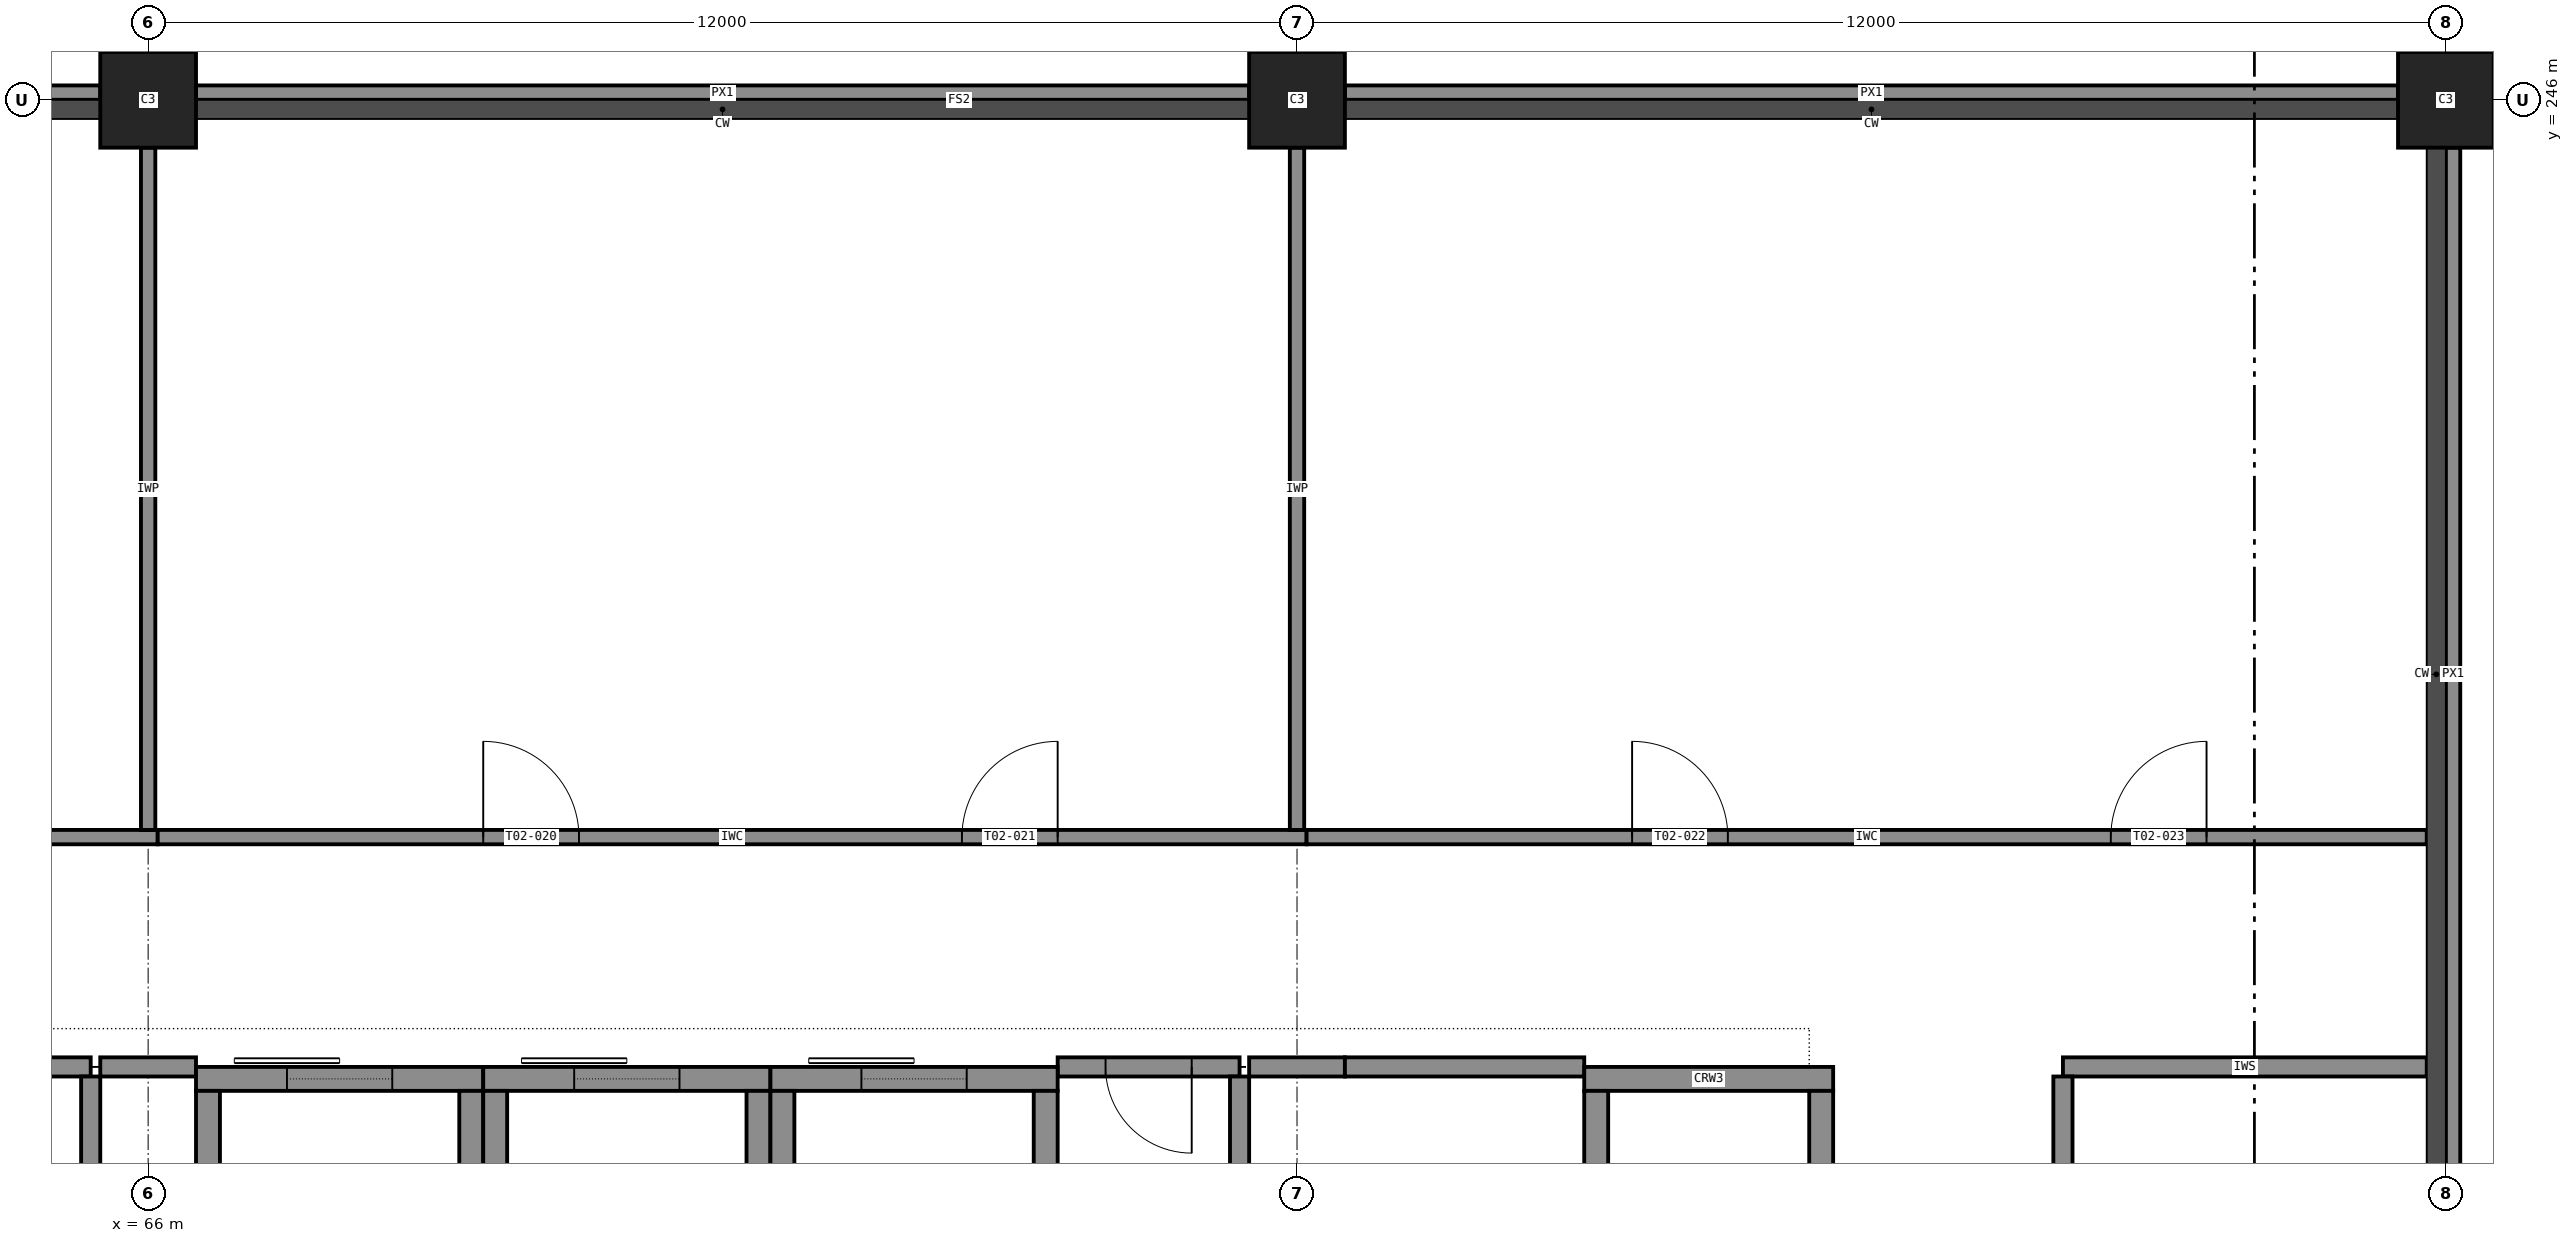
"""IFC4 building model, lengths in metres.
Left out: names, types, materials, properties, quantities, classifications, styles, units other than length and angle.
Written with IfcOpenShell. Run it as: python <this file> out.ifc"""

import sys

from ifc_helpers import new_model, si_unit, direction, frame, frame_2d, origin, origin_2d, place, context, subcontext, project, spatial, rectangle, extrude, element, fill, save


model = new_model("IFC4")
c1 = context("Model", 3, precision=1e-05, world=origin(), true_north=direction((0.0, 1.0)))
c2 = subcontext(c1, "Body", "Model", "MODEL_VIEW")
j1 = project(units=[si_unit("LENGTHUNIT", "METRE"), si_unit("PLANEANGLEUNIT", "RADIAN")], contexts=[c1])
p1 = place(None, origin())
s1 = spatial("IfcSite", under=j1, at=p1, CompositionType="ELEMENT")
p2 = place(p1, origin())
s2 = spatial("IfcBuilding", under=s1, at=p2, CompositionType="ELEMENT")
p3 = place(p2, frame((0.0, 0.0, 12.0)))
s3 = spatial("IfcBuildingStorey", under=s2, at=p3, CompositionType="ELEMENT", Elevation=12.0)
for number, where, z_axis, x_axis in (
    (1, (66.0, 246.0, 0.0), (0.0, 0.0, 1.0), (1.0, 0.0, 0.0)),
    (2, (78.0, 246.0, 0.0), (0.0, 0.0, 1.0), (1.0, 0.0, 0.0)),
    (3, (90.0, 246.0, 0.0), (0.0, 0.0, 1.0), (1.0, 0.0, 0.0)),
):
    element("IfcColumn", number, at=place(p3, frame(where, z_axis=z_axis, x_axis=x_axis)), inside=s3, PredefinedType="COLUMN", context=c2, shape_type="SweptSolid", body=[
        extrude(rectangle(XDim=1.0, YDim=1.0, at=origin_2d()), origin(), (0.0, 0.0, 1.0), 5.0),
    ])
p4 = place(p3, frame((66.5, 235.775, 0.0), z_axis=(0.0, 0.0, 1.0), x_axis=(1.0, 0.0, 0.0)))
e4 = element("IfcWall", 4, at=p4, inside=s3, PredefinedType="SHEAR", context=c2, shape_type="SweptSolid", body=[
    extrude(rectangle(XDim=3.0, YDim=0.25, at=frame_2d((1.5, 0.0))), origin(), (0.0, 0.0, 1.0), 5.0),
])
p5 = place(p4, frame((0.95, 0.0, 0.0)))
e5 = element("IfcOpeningElement", 5, at=p5, cuts=e4, PredefinedType="OPENING", context=c2, shape_type="SweptSolid", body=[
    extrude(rectangle(XDim=1.1, YDim=2.1, at=frame_2d((0.55, 1.05))), frame((0.0, 0.135, 0.0), z_axis=(0.0, -1.0, 0.0), x_axis=(1.0, 0.0, 0.0)), (0.0, 0.0, 1.0), 0.27),
])
for number, where, z_axis, x_axis in (
    (6, (66.625, 232.35, 0.0), (0.0, 0.0, 1.0), (0.0, 1.0, 0.0)),
    (7, (69.375, 232.35, 0.0), (0.0, 0.0, 1.0), (0.0, 1.0, 0.0)),
):
    element("IfcWall", number, at=place(p3, frame(where, z_axis=z_axis, x_axis=x_axis)), inside=s3, PredefinedType="SHEAR", context=c2, shape_type="SweptSolid", body=[
        extrude(rectangle(XDim=3.3, YDim=0.25, at=frame_2d((1.65, 0.0))), origin(), (0.0, 0.0, 1.0), 5.0),
    ])
p6 = place(p3, frame((69.5, 235.775, 0.0), z_axis=(0.0, 0.0, 1.0), x_axis=(1.0, 0.0, 0.0)))
e8 = element("IfcWall", 8, at=p6, inside=s3, PredefinedType="SHEAR", context=c2, shape_type="SweptSolid", body=[
    extrude(rectangle(XDim=3.0, YDim=0.25, at=frame_2d((1.5, 0.0))), origin(), (0.0, 0.0, 1.0), 5.0),
])
p7 = place(p6, frame((0.95, 0.0, 0.0)))
e9 = element("IfcOpeningElement", 9, at=p7, cuts=e8, PredefinedType="OPENING", context=c2, shape_type="SweptSolid", body=[
    extrude(rectangle(XDim=1.1, YDim=2.1, at=frame_2d((0.55, 1.05))), frame((0.0, 0.135, 0.0), z_axis=(0.0, -1.0, 0.0), x_axis=(1.0, 0.0, 0.0)), (0.0, 0.0, 1.0), 0.27),
])
for number, where, z_axis, x_axis in (
    (10, (69.625, 232.35, 0.0), (0.0, 0.0, 1.0), (0.0, 1.0, 0.0)),
    (11, (72.375, 232.35, 0.0), (0.0, 0.0, 1.0), (0.0, 1.0, 0.0)),
):
    element("IfcWall", number, at=place(p3, frame(where, z_axis=z_axis, x_axis=x_axis)), inside=s3, PredefinedType="SHEAR", context=c2, shape_type="SweptSolid", body=[
        extrude(rectangle(XDim=3.3, YDim=0.25, at=frame_2d((1.65, 0.0))), origin(), (0.0, 0.0, 1.0), 5.0),
    ])
p8 = place(p3, frame((72.5, 235.775, 0.0), z_axis=(0.0, 0.0, 1.0), x_axis=(1.0, 0.0, 0.0)))
e12 = element("IfcWall", 12, at=p8, inside=s3, PredefinedType="SHEAR", context=c2, shape_type="SweptSolid", body=[
    extrude(rectangle(XDim=3.0, YDim=0.25, at=frame_2d((1.5, 0.0))), origin(), (0.0, 0.0, 1.0), 5.0),
])
p9 = place(p8, frame((0.95, 0.0, 0.0)))
e13 = element("IfcOpeningElement", 13, at=p9, cuts=e12, PredefinedType="OPENING", context=c2, shape_type="SweptSolid", body=[
    extrude(rectangle(XDim=1.1, YDim=2.1, at=frame_2d((0.55, 1.05))), frame((0.0, 0.135, 0.0), z_axis=(0.0, -1.0, 0.0), x_axis=(1.0, 0.0, 0.0)), (0.0, 0.0, 1.0), 0.27),
])
for number, where, z_axis, x_axis in (
    (14, (72.625, 232.35, 0.0), (0.0, 0.0, 1.0), (0.0, 1.0, 0.0)),
    (15, (75.375, 232.35, 0.0), (0.0, 0.0, 1.0), (0.0, 1.0, 0.0)),
):
    element("IfcWall", number, at=place(p3, frame(where, z_axis=z_axis, x_axis=x_axis)), inside=s3, PredefinedType="SHEAR", context=c2, shape_type="SweptSolid", body=[
        extrude(rectangle(XDim=3.3, YDim=0.25, at=frame_2d((1.65, 0.0))), origin(), (0.0, 0.0, 1.0), 5.0),
    ])
p10 = place(p3, frame((81.0, 235.775, 0.0), z_axis=(0.0, 0.0, 1.0), x_axis=(1.0, 0.0, 0.0)))
e16 = element("IfcWall", 16, at=p10, inside=s3, PredefinedType="SHEAR", context=c2, shape_type="SweptSolid", body=[
    extrude(rectangle(XDim=2.6, YDim=0.25, at=frame_2d((1.3, 0.0))), origin(), (0.0, 0.0, 1.0), 5.0),
])
p11 = place(p3, frame((81.125, 232.35, 0.0), z_axis=(0.0, 0.0, 1.0), x_axis=(0.0, 1.0, 0.0)))
e17 = element("IfcWall", 17, at=p11, inside=s3, PredefinedType="SHEAR", context=c2, shape_type="SweptSolid", body=[
    extrude(rectangle(XDim=3.3, YDim=0.25, at=frame_2d((1.65, 0.0))), origin(), (0.0, 0.0, 1.0), 5.0),
])
p12 = place(p11, frame((1.1, 0.0, 0.0)))
e18 = element("IfcOpeningElement", 18, at=p12, cuts=e17, PredefinedType="OPENING", context=c2, shape_type="SweptSolid", body=[
    extrude(rectangle(XDim=1.1, YDim=2.1, at=frame_2d((0.55, 1.05))), frame((0.0, 0.135, 0.0), z_axis=(0.0, -1.0, 0.0), x_axis=(1.0, 0.0, 0.0)), (0.0, 0.0, 1.0), 0.27),
])
p13 = place(p3, frame((83.475, 232.35, 0.0), z_axis=(0.0, 0.0, 1.0), x_axis=(0.0, 1.0, 0.0)))
e19 = element("IfcWall", 19, at=p13, inside=s3, PredefinedType="SHEAR", context=c2, shape_type="SweptSolid", body=[
    extrude(rectangle(XDim=3.3, YDim=0.25, at=frame_2d((1.65, 0.0))), origin(), (0.0, 0.0, 1.0), 5.0),
])
for number, where, z_axis, x_axis in (
    (20, (90.075, 234.5, 4.75), (0.0, 0.0, 1.0), (0.0, 1.0, 0.0)),
    (21, (89.5, 246.075, 4.75), (0.0, 0.0, 1.0), (-1.0, 0.0, 0.0)),
    (22, (77.5, 246.075, 4.75), (0.0, 0.0, 1.0), (-1.0, 0.0, 0.0)),
    (23, (65.5, 246.075, 4.75), (0.0, 0.0, 1.0), (-1.0, 0.0, 0.0)),
):
    element("IfcWall", number, at=place(p3, frame(where, z_axis=z_axis, x_axis=x_axis)), inside=s3, PredefinedType="STANDARD", context=c2, shape_type="SweptSolid", body=[
        extrude(rectangle(XDim=11.0, YDim=0.15, at=frame_2d((5.5, 0.0))), origin(), (0.0, 0.0, 1.0), 0.25),
    ])
p14 = place(p3, frame((63.5, 235.9, 0.0), z_axis=(0.0, 0.0, 1.0), x_axis=(1.0, 0.0, 0.0)))
e24 = element("IfcWall", 24, at=p14, inside=s3, PredefinedType="PARTITIONING", context=c2, shape_type="SweptSolid", body=[
    extrude(rectangle(XDim=1.9, YDim=0.2, at=frame_2d((0.95, 0.0))), origin(), (0.0, 0.0, 1.0), 4.75),
])
p15 = place(p3, frame((65.5, 235.9, 0.0), z_axis=(0.0, 0.0, 1.0), x_axis=(1.0, 0.0, 0.0)))
e25 = element("IfcWall", 25, at=p15, inside=s3, PredefinedType="PARTITIONING", context=c2, shape_type="SweptSolid", body=[
    extrude(rectangle(XDim=1.0, YDim=0.2, at=frame_2d((0.5, 0.0))), origin(), (0.0, 0.0, 1.0), 4.75),
])
p16 = place(p3, frame((77.4, 235.9, 0.0), z_axis=(0.0, 0.0, 1.0), x_axis=(-1.0, 0.0, 0.0)))
e26 = element("IfcWall", 26, at=p16, inside=s3, PredefinedType="PARTITIONING", context=c2, shape_type="SweptSolid", body=[
    extrude(rectangle(XDim=1.9, YDim=0.2, at=frame_2d((0.95, 0.0))), origin(), (0.0, 0.0, 1.0), 4.75),
])
p17 = place(p16, frame((0.5, 0.0, 0.0)))
e27 = element("IfcOpeningElement", 27, at=p17, cuts=e26, PredefinedType="OPENING", context=c2, shape_type="SweptSolid", body=[
    extrude(rectangle(XDim=0.9, YDim=2.1, at=frame_2d((0.45, 1.05))), frame((0.0, 0.11, 0.0), z_axis=(0.0, -1.0, 0.0), x_axis=(1.0, 0.0, 0.0)), (0.0, 0.0, 1.0), 0.22),
])
p18 = place(p3, frame((77.5, 235.9, 0.0), z_axis=(0.0, 0.0, 1.0), x_axis=(1.0, 0.0, 0.0)))
e28 = element("IfcWall", 28, at=p18, inside=s3, PredefinedType="PARTITIONING", context=c2, shape_type="SweptSolid", body=[
    extrude(rectangle(XDim=1.0, YDim=0.2, at=frame_2d((0.5, 0.0))), origin(), (0.0, 0.0, 1.0), 4.75),
])
p19 = place(p3, frame((78.5, 235.9, 0.0), z_axis=(0.0, 0.0, 1.0), x_axis=(1.0, 0.0, 0.0)))
e29 = element("IfcWall", 29, at=p19, inside=s3, PredefinedType="PARTITIONING", context=c2, shape_type="SweptSolid", body=[
    extrude(rectangle(XDim=2.5, YDim=0.2, at=frame_2d((1.25, 0.0))), origin(), (0.0, 0.0, 1.0), 4.75),
])
p20 = place(p3, frame((86.0, 235.9, 0.0), z_axis=(0.0, 0.0, 1.0), x_axis=(1.0, 0.0, 0.0)))
e30 = element("IfcWall", 30, at=p20, inside=s3, PredefinedType="PARTITIONING", context=c2, shape_type="SweptSolid", body=[
    extrude(rectangle(XDim=3.8, YDim=0.2, at=frame_2d((1.9, 0.0))), origin(), (0.0, 0.0, 1.0), 4.75),
])
for number, where, z_axis, x_axis in (
    (31, (65.4, 232.2, 0.0), (0.0, 0.0, 1.0), (0.0, 1.0, 0.0)),
    (32, (77.4, 232.2, 0.0), (0.0, 0.0, 1.0), (0.0, 1.0, 0.0)),
):
    element("IfcWall", number, at=place(p3, frame(where, z_axis=z_axis, x_axis=x_axis)), inside=s3, PredefinedType="PARTITIONING", context=c2, shape_type="SweptSolid", body=[
        extrude(rectangle(XDim=3.6, YDim=0.2, at=frame_2d((1.8, 0.0))), origin(), (0.0, 0.0, 1.0), 4.75),
    ])
p21 = place(p3, frame((86.0, 235.8, 0.0), z_axis=(0.0, 0.0, 1.0), x_axis=(0.0, -1.0, 0.0)))
e33 = element("IfcWall", 33, at=p21, inside=s3, PredefinedType="PARTITIONING", context=c2, shape_type="SweptSolid", body=[
    extrude(rectangle(XDim=3.6, YDim=0.2, at=frame_2d((1.8, 0.0))), origin(), (0.0, 0.0, 1.0), 4.75),
])
p22 = place(p21, frame((1.35, 0.0, 0.0)))
e34 = element("IfcOpeningElement", 34, at=p22, cuts=e33, PredefinedType="OPENING", context=c2, shape_type="SweptSolid", body=[
    extrude(rectangle(XDim=0.9, YDim=2.1, at=frame_2d((0.45, 1.05))), frame((0.0, 0.11, 0.0), z_axis=(0.0, -1.0, 0.0), x_axis=(1.0, 0.0, 0.0)), (0.0, 0.0, 1.0), 0.22),
])
p23 = place(p3, frame((54.1, 238.3, 0.0), z_axis=(0.0, 0.0, 1.0), x_axis=(1.0, 0.0, 0.0)))
e35 = element("IfcWall", 35, at=p23, inside=s3, PredefinedType="PARTITIONING", context=c2, shape_type="SweptSolid", body=[
    extrude(rectangle(XDim=12.0, YDim=0.15, at=frame_2d((6.0, 0.0))), origin(), (0.0, 0.0, 1.0), 4.75),
])
p24 = place(p23, frame((3.4, 0.0, 0.0)))
e36 = element("IfcOpeningElement", 36, at=p24, cuts=e35, PredefinedType="OPENING", context=c2, shape_type="SweptSolid", body=[
    extrude(rectangle(XDim=1.0, YDim=2.1, at=frame_2d((0.5, 1.05))), frame((0.0, 0.085, 0.0), z_axis=(0.0, -1.0, 0.0), x_axis=(1.0, 0.0, 0.0)), (0.0, 0.0, 1.0), 0.17),
])
p25 = place(p23, frame((8.4, 0.0, 0.0)))
e37 = element("IfcOpeningElement", 37, at=p25, cuts=e35, PredefinedType="OPENING", context=c2, shape_type="SweptSolid", body=[
    extrude(rectangle(XDim=1.0, YDim=2.1, at=frame_2d((0.5, 1.05))), frame((0.0, 0.085, 0.0), z_axis=(0.0, -1.0, 0.0), x_axis=(1.0, 0.0, 0.0)), (0.0, 0.0, 1.0), 0.17),
])
p26 = place(p3, frame((66.1, 238.3, 0.0), z_axis=(0.0, 0.0, 1.0), x_axis=(1.0, 0.0, 0.0)))
e38 = element("IfcWall", 38, at=p26, inside=s3, PredefinedType="PARTITIONING", context=c2, shape_type="SweptSolid", body=[
    extrude(rectangle(XDim=12.0, YDim=0.15, at=frame_2d((6.0, 0.0))), origin(), (0.0, 0.0, 1.0), 4.75),
])
p27 = place(p26, frame((3.4, 0.0, 0.0)))
e39 = element("IfcOpeningElement", 39, at=p27, cuts=e38, PredefinedType="OPENING", context=c2, shape_type="SweptSolid", body=[
    extrude(rectangle(XDim=1.0, YDim=2.1, at=frame_2d((0.5, 1.05))), frame((0.0, 0.085, 0.0), z_axis=(0.0, -1.0, 0.0), x_axis=(1.0, 0.0, 0.0)), (0.0, 0.0, 1.0), 0.17),
])
p28 = place(p26, frame((8.4, 0.0, 0.0)))
e40 = element("IfcOpeningElement", 40, at=p28, cuts=e38, PredefinedType="OPENING", context=c2, shape_type="SweptSolid", body=[
    extrude(rectangle(XDim=1.0, YDim=2.1, at=frame_2d((0.5, 1.05))), frame((0.0, 0.085, 0.0), z_axis=(0.0, -1.0, 0.0), x_axis=(1.0, 0.0, 0.0)), (0.0, 0.0, 1.0), 0.17),
])
p29 = place(p3, frame((66.0, 245.5, 0.0), z_axis=(0.0, 0.0, 1.0), x_axis=(0.0, -1.0, 0.0)))
e41 = element("IfcWall", 41, at=p29, inside=s3, PredefinedType="PARTITIONING", context=c2, shape_type="SweptSolid", body=[
    extrude(rectangle(XDim=7.125, YDim=0.15, at=frame_2d((3.562, 0.0))), origin(), (0.0, 0.0, 1.0), 3.75),
])
p30 = place(p3, frame((78.1, 238.3, 0.0), z_axis=(0.0, 0.0, 1.0), x_axis=(1.0, 0.0, 0.0)))
e42 = element("IfcWall", 42, at=p30, inside=s3, PredefinedType="PARTITIONING", context=c2, shape_type="SweptSolid", body=[
    extrude(rectangle(XDim=11.7, YDim=0.15, at=frame_2d((5.85, 0.0))), origin(), (0.0, 0.0, 1.0), 4.75),
])
p31 = place(p30, frame((3.4, 0.0, 0.0)))
e43 = element("IfcOpeningElement", 43, at=p31, cuts=e42, PredefinedType="OPENING", context=c2, shape_type="SweptSolid", body=[
    extrude(rectangle(XDim=1.0, YDim=2.1, at=frame_2d((0.5, 1.05))), frame((0.0, 0.085, 0.0), z_axis=(0.0, -1.0, 0.0), x_axis=(1.0, 0.0, 0.0)), (0.0, 0.0, 1.0), 0.17),
])
p32 = place(p30, frame((8.4, 0.0, 0.0)))
e44 = element("IfcOpeningElement", 44, at=p32, cuts=e42, PredefinedType="OPENING", context=c2, shape_type="SweptSolid", body=[
    extrude(rectangle(XDim=1.0, YDim=2.1, at=frame_2d((0.5, 1.05))), frame((0.0, 0.085, 0.0), z_axis=(0.0, -1.0, 0.0), x_axis=(1.0, 0.0, 0.0)), (0.0, 0.0, 1.0), 0.17),
])
p33 = place(p3, frame((78.0, 245.5, 0.0), z_axis=(0.0, 0.0, 1.0), x_axis=(0.0, -1.0, 0.0)))
e45 = element("IfcWall", 45, at=p33, inside=s3, PredefinedType="PARTITIONING", context=c2, shape_type="SweptSolid", body=[
    extrude(rectangle(XDim=7.125, YDim=0.15, at=frame_2d((3.562, 0.0))), origin(), (0.0, 0.0, 1.0), 3.75),
])
p34 = place(p17, origin())
e46 = element("IfcDoor", 46, at=p34, inside=s3, OperationType="SINGLE_SWING_LEFT", PredefinedType="DOOR", context=c2, shape_type="SweptSolid", body=[
    extrude(rectangle(XDim=0.9, YDim=2.1, at=frame_2d((0.45, 1.05))), frame((0.0, 0.025, 0.0), z_axis=(0.0, -1.0, 0.0), x_axis=(1.0, 0.0, 0.0)), (0.0, 0.0, 1.0), 0.05),
])
fill(e27, e46)
p35 = place(p27, origin())
e47 = element("IfcDoor", 47, at=p35, inside=s3, OperationType="SINGLE_SWING_LEFT", PredefinedType="DOOR", context=c2, shape_type="SweptSolid", body=[
    extrude(rectangle(XDim=1.0, YDim=2.1, at=frame_2d((0.5, 1.05))), frame((0.0, 0.025, 0.0), z_axis=(0.0, -1.0, 0.0), x_axis=(1.0, 0.0, 0.0)), (0.0, 0.0, 1.0), 0.05),
])
fill(e39, e47)
p36 = place(p28, origin())
e48 = element("IfcDoor", 48, at=p36, inside=s3, OperationType="SINGLE_SWING_RIGHT", PredefinedType="DOOR", context=c2, shape_type="SweptSolid", body=[
    extrude(rectangle(XDim=1.0, YDim=2.1, at=frame_2d((0.5, 1.05))), frame((0.0, 0.025, 0.0), z_axis=(0.0, -1.0, 0.0), x_axis=(1.0, 0.0, 0.0)), (0.0, 0.0, 1.0), 0.05),
])
fill(e40, e48)
p37 = place(p31, origin())
e49 = element("IfcDoor", 49, at=p37, inside=s3, OperationType="SINGLE_SWING_LEFT", PredefinedType="DOOR", context=c2, shape_type="SweptSolid", body=[
    extrude(rectangle(XDim=1.0, YDim=2.1, at=frame_2d((0.5, 1.05))), frame((0.0, 0.025, 0.0), z_axis=(0.0, -1.0, 0.0), x_axis=(1.0, 0.0, 0.0)), (0.0, 0.0, 1.0), 0.05),
])
fill(e43, e49)
p38 = place(p32, origin())
e50 = element("IfcDoor", 50, at=p38, inside=s3, OperationType="SINGLE_SWING_RIGHT", PredefinedType="DOOR", context=c2, shape_type="SweptSolid", body=[
    extrude(rectangle(XDim=1.0, YDim=2.1, at=frame_2d((0.5, 1.05))), frame((0.0, 0.025, 0.0), z_axis=(0.0, -1.0, 0.0), x_axis=(1.0, 0.0, 0.0)), (0.0, 0.0, 1.0), 0.05),
])
fill(e44, e50)
p39 = place(p5, origin())
e51 = element("IfcDoor", 51, at=p39, inside=s3, OperationType="SLIDING_TO_LEFT", PredefinedType="DOOR", context=c2, shape_type="SweptSolid", body=[
    extrude(rectangle(XDim=1.1, YDim=2.1, at=frame_2d((0.55, 1.05))), frame((0.0, 0.025, 0.0), z_axis=(0.0, -1.0, 0.0), x_axis=(1.0, 0.0, 0.0)), (0.0, 0.0, 1.0), 0.05),
])
fill(e5, e51)
p40 = place(p7, origin())
e52 = element("IfcDoor", 52, at=p40, inside=s3, OperationType="SLIDING_TO_LEFT", PredefinedType="DOOR", context=c2, shape_type="SweptSolid", body=[
    extrude(rectangle(XDim=1.1, YDim=2.1, at=frame_2d((0.55, 1.05))), frame((0.0, 0.025, 0.0), z_axis=(0.0, -1.0, 0.0), x_axis=(1.0, 0.0, 0.0)), (0.0, 0.0, 1.0), 0.05),
])
fill(e9, e52)
p41 = place(p9, origin())
e53 = element("IfcDoor", 53, at=p41, inside=s3, OperationType="SLIDING_TO_LEFT", PredefinedType="DOOR", context=c2, shape_type="SweptSolid", body=[
    extrude(rectangle(XDim=1.1, YDim=2.1, at=frame_2d((0.55, 1.05))), frame((0.0, 0.025, 0.0), z_axis=(0.0, -1.0, 0.0), x_axis=(1.0, 0.0, 0.0)), (0.0, 0.0, 1.0), 0.05),
])
fill(e13, e53)
save(model, sys.argv[1])
